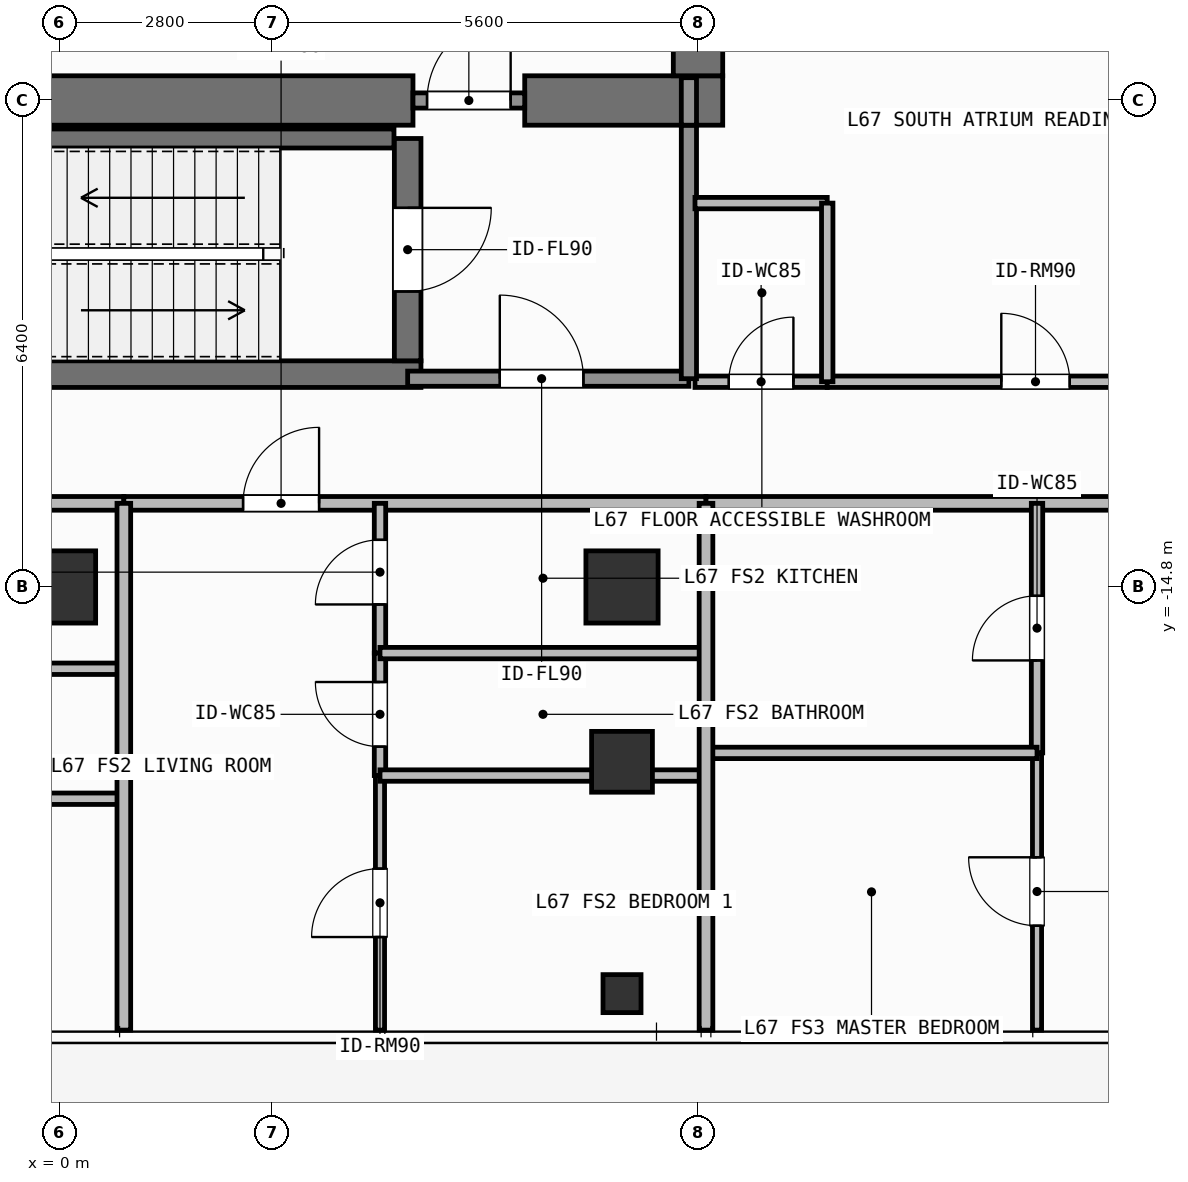
"""IFC4 building model, lengths in metres.
Left out: names, types, materials, properties, quantities, classifications, styles, units other than length and angle.
Written with IfcOpenShell. Run it as: python <this file> out.ifc"""

import sys

from ifc_helpers import new_model, si_unit, direction, frame, frame_2d, origin, origin_2d, place, context, subcontext, project, spatial, rectangle, hollow_rectangle, extrude, element, fill, save


model = new_model("IFC4")
c1 = context("Model", 3, precision=1e-05, world=origin(), true_north=direction((0.0, 1.0)))
c2 = subcontext(c1, "Body", "Model", "MODEL_VIEW")
j1 = project(units=[si_unit("LENGTHUNIT", "METRE"), si_unit("PLANEANGLEUNIT", "RADIAN")], contexts=[c1])
p1 = place(None, origin())
s1 = spatial("IfcSite", under=j1, at=p1, CompositionType="ELEMENT")
p2 = place(p1, origin())
s2 = spatial("IfcBuilding", under=s1, at=p2, CompositionType="ELEMENT")
p3 = place(p2, frame((0.0, 0.0, 274.2)))
s3 = spatial("IfcBuildingStorey", under=s2, at=p3, CompositionType="ELEMENT", Elevation=274.2)
p4 = place(p3, frame((-2.62, -8.4, 0.0), z_axis=(0.0, 0.0, 1.0), x_axis=(1.0, 0.0, 0.0)))
e1 = element("IfcWall", 1, at=p4, inside=s3, PredefinedType="SHEAR", context=c2, shape_type="SweptSolid", body=[
    extrude(rectangle(XDim=7.27, YDim=0.65, at=frame_2d((3.635, 0.0))), origin(), (0.0, 0.0, 1.0), 3.9),
])
p5 = place(p3, frame((6.12, -8.4, 0.0), z_axis=(0.0, 0.0, 1.0), x_axis=(1.0, 0.0, 0.0)))
e2 = element("IfcWall", 2, at=p5, inside=s3, PredefinedType="SHEAR", context=c2, shape_type="SweptSolid", body=[
    extrude(rectangle(XDim=2.605, YDim=0.65, at=frame_2d((1.302, 0.0))), origin(), (0.0, 0.0, 1.0), 3.9),
])
p6 = place(p3, frame((8.4, -8.075, 0.0), z_axis=(0.0, 0.0, 1.0), x_axis=(0.0, 1.0, 0.0)))
e3 = element("IfcWall", 3, at=p6, inside=s3, PredefinedType="SHEAR", context=c2, shape_type="SweptSolid", body=[
    extrude(rectangle(XDim=2.25, YDim=0.65, at=frame_2d((1.125, 0.0))), origin(), (0.0, 0.0, 1.0), 3.9),
])
p7 = place(p3, frame((-2.555, -12.0, 0.0), z_axis=(0.0, 0.0, 1.0), x_axis=(1.0, 0.0, 0.0)))
e4 = element("IfcWall", 4, at=p7, inside=s3, PredefinedType="SHEAR", context=c2, shape_type="SweptSolid", body=[
    extrude(rectangle(XDim=7.31, YDim=0.35, at=frame_2d((3.655, 0.0))), origin(), (0.0, 0.0, 1.0), 3.9),
])
p8 = place(p3, frame((-2.2, -8.9, 0.0), z_axis=(0.0, 0.0, 1.0), x_axis=(1.0, 0.0, 0.0)))
e5 = element("IfcWall", 5, at=p8, inside=s3, PredefinedType="SHEAR", context=c2, shape_type="SweptSolid", body=[
    extrude(rectangle(XDim=6.6, YDim=0.25, at=frame_2d((3.3, 0.0))), origin(), (0.0, 0.0, 1.0), 3.9),
])
p9 = place(p3, frame((4.58, -8.9, 0.0), z_axis=(0.0, 0.0, 1.0), x_axis=(0.0, -1.0, 0.0)))
e6 = element("IfcWall", 6, at=p9, inside=s3, PredefinedType="SHEAR", context=c2, shape_type="SweptSolid", body=[
    extrude(rectangle(XDim=2.925, YDim=0.35, at=frame_2d((1.462, 0.0))), origin(), (0.0, 0.0, 1.0), 3.9),
])
p10 = place(p9, frame((0.913, 0.0, 0.0)))
e7 = element("IfcOpeningElement", 7, at=p10, cuts=e6, PredefinedType="OPENING", context=c2, shape_type="SweptSolid", body=[
    extrude(rectangle(XDim=1.1, YDim=2.15, at=frame_2d((0.55, 1.075))), frame((0.0, 0.185, 0.0), z_axis=(0.0, -1.0, 0.0), x_axis=(1.0, 0.0, 0.0)), (0.0, 0.0, 1.0), 0.37),
])
for number, where, z_axis, x_axis in (
    (8, (0.0, -14.8, 0.0), (0.0, 0.0, 1.0), (1.0, 0.0, 0.0)),
    (9, (7.4, -14.8, 0.0), (0.0, 0.0, 1.0), (1.0, 0.0, 0.0)),
):
    element("IfcColumn", number, at=place(p3, frame(where, z_axis=z_axis, x_axis=x_axis)), inside=s3, PredefinedType="COLUMN", context=c2, shape_type="SweptSolid", body=[
        extrude(rectangle(XDim=0.95, YDim=0.95, at=origin_2d()), origin(), (0.0, 0.0, 1.0), 3.9),
    ])
p11 = place(p3, frame((7.4, -17.1, 0.0), z_axis=(0.0, 0.0, 1.0), x_axis=(1.0, 0.0, 0.0)))
e10 = element("IfcColumn", 10, at=p11, inside=s3, PredefinedType="COLUMN", context=c2, shape_type="SweptSolid", body=[
    extrude(hollow_rectangle(XDim=0.8, YDim=0.8, WallThickness=0.036, at=origin_2d()), origin(), (0.0, 0.0, 1.0), 3.9),
])
p12 = place(p3, frame((7.4, -20.15, 0.0), z_axis=(0.0, 0.0, 1.0), x_axis=(1.0, 0.0, 0.0)))
e11 = element("IfcColumn", 11, at=p12, inside=s3, PredefinedType="COLUMN", context=c2, shape_type="SweptSolid", body=[
    extrude(hollow_rectangle(XDim=0.5, YDim=0.5, WallThickness=0.025, at=origin_2d()), origin(), (0.0, 0.0, 1.0), 3.9),
])
p13 = place(p3, frame((4.58, -12.06, 0.0), z_axis=(0.0, 0.0, 1.0), x_axis=(1.0, 0.0, 0.0)))
e12 = element("IfcWall", 12, at=p13, inside=s3, PredefinedType="SOLIDWALL", context=c2, shape_type="SweptSolid", body=[
    extrude(rectangle(XDim=3.7, YDim=0.2, at=frame_2d((1.85, 0.0))), origin(), (0.0, 0.0, 1.0), 3.68),
])
p14 = place(p13, frame((1.212, 0.0, 0.0)))
e13 = element("IfcOpeningElement", 13, at=p14, cuts=e12, PredefinedType="OPENING", context=c2, shape_type="SweptSolid", body=[
    extrude(rectangle(XDim=1.1, YDim=2.15, at=frame_2d((0.55, 1.075))), frame((0.0, 0.11, 0.0), z_axis=(0.0, -1.0, 0.0), x_axis=(1.0, 0.0, 0.0)), (0.0, 0.0, 1.0), 0.22),
])
p15 = place(p3, frame((4.65, -8.4, 0.0), z_axis=(0.0, 0.0, 1.0), x_axis=(1.0, 0.0, 0.0)))
e14 = element("IfcWall", 14, at=p15, inside=s3, PredefinedType="SOLIDWALL", context=c2, shape_type="SweptSolid", body=[
    extrude(rectangle(XDim=1.47, YDim=0.2, at=frame_2d((0.735, 0.0))), origin(), (0.0, 0.0, 1.0), 2.92),
])
p16 = place(p15, frame((0.185, 0.0, 0.0)))
e15 = element("IfcOpeningElement", 15, at=p16, cuts=e14, PredefinedType="OPENING", context=c2, shape_type="SweptSolid", body=[
    extrude(rectangle(XDim=1.1, YDim=2.15, at=frame_2d((0.55, 1.075))), frame((0.0, 0.11, 0.0), z_axis=(0.0, -1.0, 0.0), x_axis=(1.0, 0.0, 0.0)), (0.0, 0.0, 1.0), 0.22),
])
p17 = place(p3, frame((8.36, -12.1, 0.0), z_axis=(0.0, 0.0, 1.0), x_axis=(1.0, 0.0, 0.0)))
e16 = element("IfcWall", 16, at=p17, inside=s3, PredefinedType="PARTITIONING", context=c2, shape_type="SweptSolid", body=[
    extrude(rectangle(XDim=1.74, YDim=0.15, at=frame_2d((0.87, 0.0))), origin(), (0.0, 0.0, 1.0), 3.68),
])
p18 = place(p17, frame((0.445, 0.0, 0.0)))
e17 = element("IfcOpeningElement", 17, at=p18, cuts=e16, PredefinedType="OPENING", context=c2, shape_type="SweptSolid", body=[
    extrude(rectangle(XDim=0.85, YDim=2.1, at=frame_2d((0.425, 1.05))), frame((0.0, 0.085, 0.0), z_axis=(0.0, -1.0, 0.0), x_axis=(1.0, 0.0, 0.0)), (0.0, 0.0, 1.0), 0.17),
])
p19 = place(p3, frame((10.1, -12.1, 0.0), z_axis=(0.0, 0.0, 1.0), x_axis=(1.0, 0.0, 0.0)))
e18 = element("IfcWall", 18, at=p19, inside=s3, PredefinedType="PARTITIONING", context=c2, shape_type="SweptSolid", body=[
    extrude(rectangle(XDim=5.48, YDim=0.15, at=frame_2d((2.74, 0.0))), origin(), (0.0, 0.0, 1.0), 3.68),
])
p20 = place(p19, frame((2.29, 0.0, 0.0)))
e19 = element("IfcOpeningElement", 19, at=p20, cuts=e18, PredefinedType="OPENING", context=c2, shape_type="SweptSolid", body=[
    extrude(rectangle(XDim=0.9, YDim=2.1, at=frame_2d((0.45, 1.05))), frame((0.0, 0.085, 0.0), z_axis=(0.0, -1.0, 0.0), x_axis=(1.0, 0.0, 0.0)), (0.0, 0.0, 1.0), 0.17),
])
p21 = place(p3, frame((-13.72, -13.7, 0.0), z_axis=(0.0, 0.0, 1.0), x_axis=(1.0, 0.0, 0.0)))
e20 = element("IfcWall", 20, at=p21, inside=s3, PredefinedType="PARTITIONING", context=c2, shape_type="SweptSolid", body=[
    extrude(rectangle(XDim=14.566, YDim=0.18, at=frame_2d((7.283, 0.0))), origin(), (0.0, 0.0, 1.0), 3.68),
])
p22 = place(p21, frame((6.962, 0.0, 0.0)))
e21 = element("IfcOpeningElement", 21, at=p22, cuts=e20, PredefinedType="OPENING", context=c2, shape_type="SweptSolid", body=[
    extrude(rectangle(XDim=1.0, YDim=2.2, at=frame_2d((0.5, 1.1))), frame((0.0, 0.1, 0.0), z_axis=(0.0, -1.0, 0.0), x_axis=(1.0, 0.0, 0.0)), (0.0, 0.0, 1.0), 0.2),
])
p23 = place(p3, frame((0.846, -13.7, 0.0), z_axis=(0.0, 0.0, 1.0), x_axis=(1.0, 0.0, 0.0)))
e22 = element("IfcWall", 22, at=p23, inside=s3, PredefinedType="PARTITIONING", context=c2, shape_type="SweptSolid", body=[
    extrude(rectangle(XDim=7.659, YDim=0.18, at=frame_2d((3.83, 0.0))), origin(), (0.0, 0.0, 1.0), 3.68),
])
p24 = place(p23, frame((1.569, 0.0, 0.0)))
e23 = element("IfcOpeningElement", 23, at=p24, cuts=e22, PredefinedType="OPENING", context=c2, shape_type="SweptSolid", body=[
    extrude(rectangle(XDim=1.0, YDim=2.2, at=frame_2d((0.5, 1.1))), frame((0.0, 0.1, 0.0), z_axis=(0.0, -1.0, 0.0), x_axis=(1.0, 0.0, 0.0)), (0.0, 0.0, 1.0), 0.2),
])
p25 = place(p3, frame((4.216, -15.67, 0.0), z_axis=(0.0, 0.0, 1.0), x_axis=(0.0, 1.0, 0.0)))
e24 = element("IfcWall", 24, at=p25, inside=s3, PredefinedType="PARTITIONING", context=c2, shape_type="SweptSolid", body=[
    extrude(rectangle(XDim=1.97, YDim=0.15, at=frame_2d((0.985, 0.0))), origin(), (0.0, 0.0, 1.0), 3.68),
])
p26 = place(p25, frame((0.64, 0.0, 0.0)))
e25 = element("IfcOpeningElement", 25, at=p26, cuts=e24, PredefinedType="OPENING", context=c2, shape_type="SweptSolid", body=[
    extrude(rectangle(XDim=0.85, YDim=2.1, at=frame_2d((0.425, 1.05))), frame((0.0, 0.085, 0.0), z_axis=(0.0, -1.0, 0.0), x_axis=(1.0, 0.0, 0.0)), (0.0, 0.0, 1.0), 0.17),
])
p27 = place(p3, frame((4.216, -17.281, 0.0), z_axis=(0.0, 0.0, 1.0), x_axis=(0.0, 1.0, 0.0)))
e26 = element("IfcWall", 26, at=p27, inside=s3, PredefinedType="PARTITIONING", context=c2, shape_type="SweptSolid", body=[
    extrude(rectangle(XDim=1.611, YDim=0.15, at=frame_2d((0.806, 0.0))), origin(), (0.0, 0.0, 1.0), 3.68),
])
p28 = place(p27, frame((0.381, 0.0, 0.0)))
e27 = element("IfcOpeningElement", 27, at=p28, cuts=e26, PredefinedType="OPENING", context=c2, shape_type="SweptSolid", body=[
    extrude(rectangle(XDim=0.85, YDim=2.1, at=frame_2d((0.425, 1.05))), frame((0.0, 0.085, 0.0), z_axis=(0.0, -1.0, 0.0), x_axis=(1.0, 0.0, 0.0)), (0.0, 0.0, 1.0), 0.17),
])
p29 = place(p3, frame((4.216, -20.63, 0.0), z_axis=(0.0, 0.0, 1.0), x_axis=(0.0, 1.0, 0.0)))
e28 = element("IfcWall", 28, at=p29, inside=s3, PredefinedType="PARTITIONING", context=c2, shape_type="SweptSolid", body=[
    extrude(rectangle(XDim=3.349, YDim=0.12, at=frame_2d((1.674, 0.0))), origin(), (0.0, 0.0, 1.0), 3.68),
])
p30 = place(p29, frame((1.225, 0.0, 0.0)))
e29 = element("IfcOpeningElement", 29, at=p30, cuts=e28, PredefinedType="OPENING", context=c2, shape_type="SweptSolid", body=[
    extrude(rectangle(XDim=0.9, YDim=2.1, at=frame_2d((0.45, 1.05))), frame((0.0, 0.07, 0.0), z_axis=(0.0, -1.0, 0.0), x_axis=(1.0, 0.0, 0.0)), (0.0, 0.0, 1.0), 0.14),
])
p31 = place(p3, frame((8.505, -13.7, 0.0), z_axis=(0.0, 0.0, 1.0), x_axis=(1.0, 0.0, 0.0)))
e30 = element("IfcWall", 30, at=p31, inside=s3, PredefinedType="PARTITIONING", context=c2, shape_type="SweptSolid", body=[
    extrude(rectangle(XDim=13.015, YDim=0.18, at=frame_2d((6.508, 0.0))), origin(), (0.0, 0.0, 1.0), 3.68),
])
p32 = place(p31, frame((6.817, 0.0, 0.0)))
e31 = element("IfcOpeningElement", 31, at=p32, cuts=e30, PredefinedType="OPENING", context=c2, shape_type="SweptSolid", body=[
    extrude(rectangle(XDim=1.0, YDim=2.2, at=frame_2d((0.5, 1.1))), frame((0.0, 0.1, 0.0), z_axis=(0.0, -1.0, 0.0), x_axis=(1.0, 0.0, 0.0)), (0.0, 0.0, 1.0), 0.2),
])
p33 = place(p3, frame((12.86, -16.983, 0.0), z_axis=(0.0, 0.0, 1.0), x_axis=(0.0, 1.0, 0.0)))
e32 = element("IfcWall", 32, at=p33, inside=s3, PredefinedType="PARTITIONING", context=c2, shape_type="SweptSolid", body=[
    extrude(rectangle(XDim=3.283, YDim=0.15, at=frame_2d((1.642, 0.0))), origin(), (0.0, 0.0, 1.0), 3.68),
])
p34 = place(p33, frame((1.217, 0.0, 0.0)))
e33 = element("IfcOpeningElement", 33, at=p34, cuts=e32, PredefinedType="OPENING", context=c2, shape_type="SweptSolid", body=[
    extrude(rectangle(XDim=0.85, YDim=2.1, at=frame_2d((0.425, 1.05))), frame((0.0, 0.085, 0.0), z_axis=(0.0, -1.0, 0.0), x_axis=(1.0, 0.0, 0.0)), (0.0, 0.0, 1.0), 0.17),
])
p35 = place(p3, frame((12.86, -20.63, 0.0), z_axis=(0.0, 0.0, 1.0), x_axis=(0.0, 1.0, 0.0)))
e34 = element("IfcWall", 34, at=p35, inside=s3, PredefinedType="PARTITIONING", context=c2, shape_type="SweptSolid", body=[
    extrude(rectangle(XDim=3.647, YDim=0.12, at=frame_2d((1.823, 0.0))), origin(), (0.0, 0.0, 1.0), 3.68),
])
p36 = place(p35, frame((1.374, 0.0, 0.0)))
e35 = element("IfcOpeningElement", 35, at=p36, cuts=e34, PredefinedType="OPENING", context=c2, shape_type="SweptSolid", body=[
    extrude(rectangle(XDim=0.9, YDim=2.1, at=frame_2d((0.45, 1.05))), frame((0.0, 0.07, 0.0), z_axis=(0.0, -1.0, 0.0), x_axis=(1.0, 0.0, 0.0)), (0.0, 0.0, 1.0), 0.14),
])
p37 = place(p3, frame((8.28, -12.06, 0.0), z_axis=(0.0, 0.0, 1.0), x_axis=(0.0, 1.0, 0.0)))
e36 = element("IfcWall", 36, at=p37, inside=s3, PredefinedType="SOLIDWALL", context=c2, shape_type="SweptSolid", body=[
    extrude(rectangle(XDim=3.335, YDim=0.2, at=frame_2d((1.667, 0.0))), origin(), (0.0, 0.0, 1.0), 3.68),
])
p38 = place(p3, frame((8.28, -8.725, 0.0), z_axis=(0.0, 0.0, 1.0), x_axis=(0.0, 1.0, 0.0)))
e37 = element("IfcWall", 37, at=p38, inside=s3, PredefinedType="SOLIDWALL", context=c2, shape_type="SweptSolid", body=[
    extrude(rectangle(XDim=0.625, YDim=0.2, at=frame_2d((0.312, 0.0))), origin(), (0.0, 0.0, 1.0), 3.68),
])
p39 = place(p3, frame((8.36, -9.75, 0.0), z_axis=(0.0, 0.0, 1.0), x_axis=(1.0, 0.0, 0.0)))
e38 = element("IfcWall", 38, at=p39, inside=s3, PredefinedType="PARTITIONING", context=c2, shape_type="SweptSolid", body=[
    extrude(rectangle(XDim=1.74, YDim=0.15, at=frame_2d((0.87, 0.0))), origin(), (0.0, 0.0, 1.0), 3.68),
])
p40 = place(p3, frame((10.1, -12.1, 0.0), z_axis=(0.0, 0.0, 1.0), x_axis=(0.0, 1.0, 0.0)))
e39 = element("IfcWall", 39, at=p40, inside=s3, PredefinedType="PARTITIONING", context=c2, shape_type="SweptSolid", body=[
    extrude(rectangle(XDim=2.35, YDim=0.15, at=frame_2d((1.175, 0.0))), origin(), (0.0, 0.0, 1.0), 3.68),
])
for number, where, z_axis, x_axis in (
    (40, (-3.699, -15.876, 0.0), (0.0, 0.0, 1.0), (1.0, 0.0, 0.0)),
    (41, (-3.699, -17.586, 0.0), (0.0, 0.0, 1.0), (1.0, 0.0, 0.0)),
):
    element("IfcWall", number, at=place(p3, frame(where, z_axis=z_axis, x_axis=x_axis)), inside=s3, PredefinedType="PARTITIONING", context=c2, shape_type="SweptSolid", body=[
        extrude(rectangle(XDim=4.545, YDim=0.15, at=frame_2d((2.272, 0.0))), origin(), (0.0, 0.0, 1.0), 3.68),
    ])
p41 = place(p3, frame((4.216, -15.67, 0.0), z_axis=(0.0, 0.0, 1.0), x_axis=(1.0, 0.0, 0.0)))
e42 = element("IfcWall", 42, at=p41, inside=s3, PredefinedType="PARTITIONING", context=c2, shape_type="SweptSolid", body=[
    extrude(rectangle(XDim=4.289, YDim=0.15, at=frame_2d((2.145, 0.0))), origin(), (0.0, 0.0, 1.0), 3.68),
])
p42 = place(p3, frame((4.216, -17.281, 0.0), z_axis=(0.0, 0.0, 1.0), x_axis=(1.0, 0.0, 0.0)))
e43 = element("IfcWall", 43, at=p42, inside=s3, PredefinedType="PARTITIONING", context=c2, shape_type="SweptSolid", body=[
    extrude(rectangle(XDim=4.289, YDim=0.15, at=frame_2d((2.145, 0.0))), origin(), (0.0, 0.0, 1.0), 3.182),
])
p43 = place(p3, frame((0.846, -20.63, 0.0), z_axis=(0.0, 0.0, 1.0), x_axis=(0.0, 1.0, 0.0)))
e44 = element("IfcWall", 44, at=p43, inside=s3, PredefinedType="PARTITIONING", context=c2, shape_type="SweptSolid", body=[
    extrude(rectangle(XDim=6.93, YDim=0.18, at=frame_2d((3.465, 0.0))), origin(), (0.0, 0.0, 1.0), 3.68),
])
p44 = place(p3, frame((8.505, -16.983, 0.0), z_axis=(0.0, 0.0, 1.0), x_axis=(1.0, 0.0, 0.0)))
e45 = element("IfcWall", 45, at=p44, inside=s3, PredefinedType="PARTITIONING", context=c2, shape_type="SweptSolid", body=[
    extrude(rectangle(XDim=4.355, YDim=0.15, at=frame_2d((2.178, 0.0))), origin(), (0.0, 0.0, 1.0), 3.182),
])
p45 = place(p3, frame((8.505, -20.63, 0.0), z_axis=(0.0, 0.0, 1.0), x_axis=(0.0, 1.0, 0.0)))
e46 = element("IfcWall", 46, at=p45, inside=s3, PredefinedType="PARTITIONING", context=c2, shape_type="SweptSolid", body=[
    extrude(rectangle(XDim=6.93, YDim=0.18, at=frame_2d((3.465, 0.0))), origin(), (0.0, 0.0, 1.0), 3.68),
])
p46 = place(p10, origin())
e47 = element("IfcDoor", 47, at=p46, inside=s3, OperationType="SINGLE_SWING_LEFT", PredefinedType="DOOR", context=c2, shape_type="SweptSolid", body=[
    extrude(rectangle(XDim=1.1, YDim=2.15, at=frame_2d((0.55, 1.075))), frame((0.0, 0.025, 0.0), z_axis=(0.0, -1.0, 0.0), x_axis=(1.0, 0.0, 0.0)), (0.0, 0.0, 1.0), 0.05),
])
fill(e7, e47)
p47 = place(p14, origin())
e48 = element("IfcDoor", 48, at=p47, inside=s3, OperationType="SINGLE_SWING_LEFT", PredefinedType="DOOR", context=c2, shape_type="SweptSolid", body=[
    extrude(rectangle(XDim=1.1, YDim=2.15, at=frame_2d((0.55, 1.075))), frame((0.0, 0.025, 0.0), z_axis=(0.0, -1.0, 0.0), x_axis=(1.0, 0.0, 0.0)), (0.0, 0.0, 1.0), 0.05),
])
fill(e13, e48)
p48 = place(p16, origin())
e49 = element("IfcDoor", 49, at=p48, inside=s3, OperationType="SINGLE_SWING_RIGHT", PredefinedType="DOOR", context=c2, shape_type="SweptSolid", body=[
    extrude(rectangle(XDim=1.1, YDim=2.15, at=frame_2d((0.55, 1.075))), frame((0.0, 0.025, 0.0), z_axis=(0.0, -1.0, 0.0), x_axis=(1.0, 0.0, 0.0)), (0.0, 0.0, 1.0), 0.05),
])
fill(e15, e49)
p49 = place(p18, origin())
e50 = element("IfcDoor", 50, at=p49, inside=s3, OperationType="SINGLE_SWING_RIGHT", PredefinedType="DOOR", context=c2, shape_type="SweptSolid", body=[
    extrude(rectangle(XDim=0.85, YDim=2.1, at=frame_2d((0.425, 1.05))), frame((0.0, 0.025, 0.0), z_axis=(0.0, -1.0, 0.0), x_axis=(1.0, 0.0, 0.0)), (0.0, 0.0, 1.0), 0.05),
])
fill(e17, e50)
p50 = place(p20, origin())
e51 = element("IfcDoor", 51, at=p50, inside=s3, OperationType="SINGLE_SWING_LEFT", PredefinedType="DOOR", context=c2, shape_type="SweptSolid", body=[
    extrude(rectangle(XDim=0.9, YDim=2.1, at=frame_2d((0.45, 1.05))), frame((0.0, 0.025, 0.0), z_axis=(0.0, -1.0, 0.0), x_axis=(1.0, 0.0, 0.0)), (0.0, 0.0, 1.0), 0.05),
])
fill(e19, e51)
p51 = place(p24, origin())
e52 = element("IfcDoor", 52, at=p51, inside=s3, OperationType="SINGLE_SWING_RIGHT", PredefinedType="DOOR", context=c2, shape_type="SweptSolid", body=[
    extrude(rectangle(XDim=1.0, YDim=2.2, at=frame_2d((0.5, 1.1))), frame((0.0, 0.025, 0.0), z_axis=(0.0, -1.0, 0.0), x_axis=(1.0, 0.0, 0.0)), (0.0, 0.0, 1.0), 0.05),
])
fill(e23, e52)
p52 = place(p26, origin())
e53 = element("IfcDoor", 53, at=p52, inside=s3, OperationType="SINGLE_SWING_LEFT", PredefinedType="DOOR", context=c2, shape_type="SweptSolid", body=[
    extrude(rectangle(XDim=0.85, YDim=2.1, at=frame_2d((0.425, 1.05))), frame((0.0, 0.025, 0.0), z_axis=(0.0, -1.0, 0.0), x_axis=(1.0, 0.0, 0.0)), (0.0, 0.0, 1.0), 0.05),
])
fill(e25, e53)
p53 = place(p28, origin())
e54 = element("IfcDoor", 54, at=p53, inside=s3, OperationType="SINGLE_SWING_RIGHT", PredefinedType="DOOR", context=c2, shape_type="SweptSolid", body=[
    extrude(rectangle(XDim=0.85, YDim=2.1, at=frame_2d((0.425, 1.05))), frame((0.0, 0.025, 0.0), z_axis=(0.0, -1.0, 0.0), x_axis=(1.0, 0.0, 0.0)), (0.0, 0.0, 1.0), 0.05),
])
fill(e27, e54)
p54 = place(p30, origin())
e55 = element("IfcDoor", 55, at=p54, inside=s3, OperationType="SINGLE_SWING_LEFT", PredefinedType="DOOR", context=c2, shape_type="SweptSolid", body=[
    extrude(rectangle(XDim=0.9, YDim=2.1, at=frame_2d((0.45, 1.05))), frame((0.0, 0.025, 0.0), z_axis=(0.0, -1.0, 0.0), x_axis=(1.0, 0.0, 0.0)), (0.0, 0.0, 1.0), 0.05),
])
fill(e29, e55)
p55 = place(p34, origin())
e56 = element("IfcDoor", 56, at=p55, inside=s3, OperationType="SINGLE_SWING_LEFT", PredefinedType="DOOR", context=c2, shape_type="SweptSolid", body=[
    extrude(rectangle(XDim=0.85, YDim=2.1, at=frame_2d((0.425, 1.05))), frame((0.0, 0.025, 0.0), z_axis=(0.0, -1.0, 0.0), x_axis=(1.0, 0.0, 0.0)), (0.0, 0.0, 1.0), 0.05),
])
fill(e33, e56)
p56 = place(p36, origin())
e57 = element("IfcDoor", 57, at=p56, inside=s3, OperationType="SINGLE_SWING_RIGHT", PredefinedType="DOOR", context=c2, shape_type="SweptSolid", body=[
    extrude(rectangle(XDim=0.9, YDim=2.1, at=frame_2d((0.45, 1.05))), frame((0.0, 0.025, 0.0), z_axis=(0.0, -1.0, 0.0), x_axis=(1.0, 0.0, 0.0)), (0.0, 0.0, 1.0), 0.05),
])
fill(e35, e57)
save(model, sys.argv[1])
